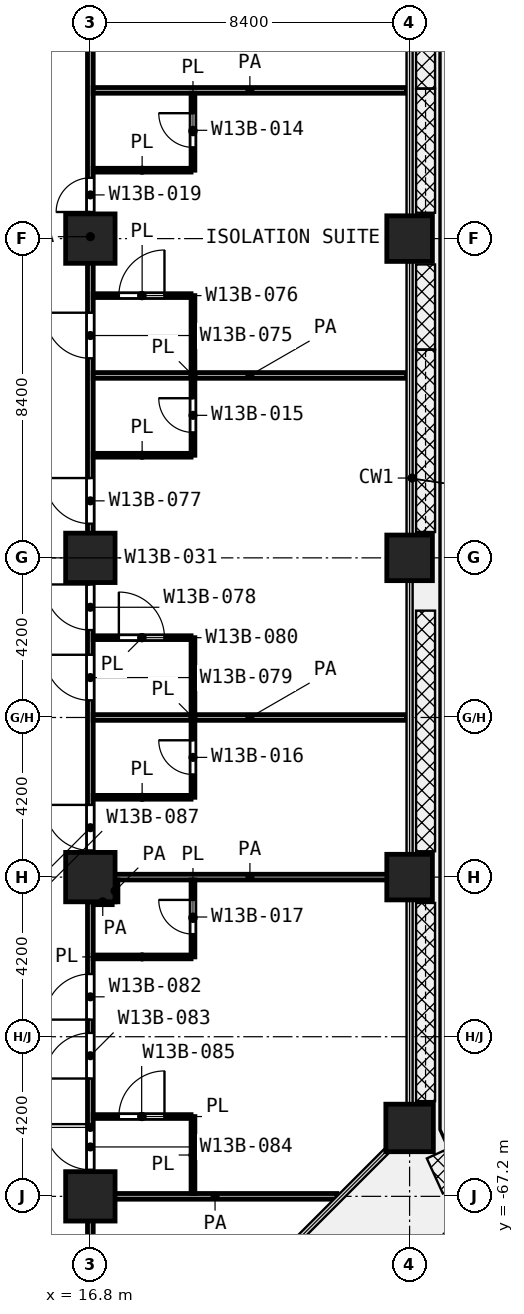
"""IFC4 building model, lengths in metres.
Left out: names, types, materials, properties, quantities, classifications, styles, units other than length and angle.
Written with IfcOpenShell. Run it as: python <this file> out.ifc"""

import sys

from ifc_helpers import new_model, si_unit, direction, frame, frame_2d, origin, origin_2d, place, context, subcontext, project, spatial, rectangle, extrude, element, fill, save


model = new_model("IFC4")
c1 = context("Model", 3, precision=1e-05, world=origin(), true_north=direction((0.0, 1.0)))
c2 = subcontext(c1, "Body", "Model", "MODEL_VIEW")
j1 = project(units=[si_unit("LENGTHUNIT", "METRE"), si_unit("PLANEANGLEUNIT", "RADIAN")], contexts=[c1])
p1 = place(None, origin())
s1 = spatial("IfcSite", under=j1, at=p1, CompositionType="ELEMENT")
p2 = place(p1, origin())
s2 = spatial("IfcBuilding", under=s1, at=p2, CompositionType="ELEMENT")
p3 = place(p2, frame((0.0, 0.0, 89.6)))
s3 = spatial("IfcBuildingStorey", under=s2, at=p3, CompositionType="ELEMENT", Elevation=89.6)
p4 = place(p3, frame((16.8, -42.0, 0.0), z_axis=(0.0, 0.0, 1.0), x_axis=(1.0, 0.0, 0.0)))
e1 = element("IfcColumn", 1, at=p4, inside=s3, PredefinedType="COLUMN", context=c2, shape_type="SweptSolid", body=[
    extrude(rectangle(XDim=1.3, YDim=1.3, at=origin_2d()), origin(), (0.0, 0.0, 1.0), 4.2),
])
p5 = place(p3, frame((25.2, -42.0, 0.0), z_axis=(0.0, 0.0, 1.0), x_axis=(1.0, 0.0, 0.0)))
e2 = element("IfcColumn", 2, at=p5, inside=s3, PredefinedType="COLUMN", context=c2, shape_type="SweptSolid", body=[
    extrude(rectangle(XDim=1.2, YDim=1.2, at=origin_2d()), origin(), (0.0, 0.0, 1.0), 4.2),
])
p6 = place(p3, frame((16.8, -50.4, 0.0), z_axis=(0.0, 0.0, 1.0), x_axis=(1.0, 0.0, 0.0)))
e3 = element("IfcColumn", 3, at=p6, inside=s3, PredefinedType="COLUMN", context=c2, shape_type="SweptSolid", body=[
    extrude(rectangle(XDim=1.3, YDim=1.3, at=origin_2d()), origin(), (0.0, 0.0, 1.0), 4.2),
])
p7 = place(p3, frame((25.2, -50.4, 0.0), z_axis=(0.0, 0.0, 1.0), x_axis=(1.0, 0.0, 0.0)))
e4 = element("IfcColumn", 4, at=p7, inside=s3, PredefinedType="COLUMN", context=c2, shape_type="SweptSolid", body=[
    extrude(rectangle(XDim=1.2, YDim=1.2, at=origin_2d()), origin(), (0.0, 0.0, 1.0), 4.2),
])
p8 = place(p3, frame((16.8, -58.8, 0.0), z_axis=(0.0, 0.0, 1.0), x_axis=(1.0, 0.0, 0.0)))
e5 = element("IfcColumn", 5, at=p8, inside=s3, PredefinedType="COLUMN", context=c2, shape_type="SweptSolid", body=[
    extrude(rectangle(XDim=1.3, YDim=1.3, at=origin_2d()), origin(), (0.0, 0.0, 1.0), 4.2),
])
p9 = place(p3, frame((25.2, -58.8, 0.0), z_axis=(0.0, 0.0, 1.0), x_axis=(1.0, 0.0, 0.0)))
e6 = element("IfcColumn", 6, at=p9, inside=s3, PredefinedType="COLUMN", context=c2, shape_type="SweptSolid", body=[
    extrude(rectangle(XDim=1.2, YDim=1.2, at=origin_2d()), origin(), (0.0, 0.0, 1.0), 4.2),
])
p10 = place(p3, frame((25.2, -65.4, 0.0), z_axis=(0.0, 0.0, 1.0), x_axis=(1.0, 0.0, 0.0)))
e7 = element("IfcColumn", 7, at=p10, inside=s3, PredefinedType="COLUMN", context=c2, shape_type="SweptSolid", body=[
    extrude(rectangle(XDim=1.25, YDim=1.25, at=origin_2d()), origin(), (0.0, 0.0, 1.0), 4.2),
])
p11 = place(p3, frame((16.8, -67.2, 0.0), z_axis=(0.0, 0.0, 1.0), x_axis=(1.0, 0.0, 0.0)))
e8 = element("IfcColumn", 8, at=p11, inside=s3, PredefinedType="COLUMN", context=c2, shape_type="SweptSolid", body=[
    extrude(rectangle(XDim=1.3, YDim=1.3, at=origin_2d()), origin(), (0.0, 0.0, 1.0), 4.2),
])
p12 = place(p3, frame((16.875, -65.1, 0.0), z_axis=(0.0, 0.0, 1.0), x_axis=(1.0, 0.0, 0.0)))
e9 = element("IfcWall", 9, at=p12, inside=s3, PredefinedType="PARTITIONING", context=c2, shape_type="SweptSolid", body=[
    extrude(rectangle(XDim=2.575, YDim=0.1, at=frame_2d((1.288, 0.0))), origin(), (0.0, 0.0, 1.0), 3.7),
])
p13 = place(p12, frame((0.675, 0.0, 0.0)))
e10 = element("IfcOpeningElement", 10, at=p13, cuts=e9, PredefinedType="OPENING", context=c2, shape_type="SweptSolid", body=[
    extrude(rectangle(XDim=1.2, YDim=2.1, at=frame_2d((0.6, 1.05))), frame((0.0, 0.06, 0.0), z_axis=(0.0, -1.0, 0.0), x_axis=(1.0, 0.0, 0.0)), (0.0, 0.0, 1.0), 0.12),
])
for number, where, z_axis, x_axis in (
    (11, (16.875, -60.9, 0.0), (0.0, 0.0, 1.0), (1.0, 0.0, 0.0)),
    (12, (16.875, -56.7, 0.0), (0.0, 0.0, 1.0), (1.0, 0.0, 0.0)),
):
    element("IfcWall", number, at=place(p3, frame(where, z_axis=z_axis, x_axis=x_axis)), inside=s3, PredefinedType="PARTITIONING", context=c2, shape_type="SweptSolid", body=[
        extrude(rectangle(XDim=2.575, YDim=0.1, at=frame_2d((1.288, 0.0))), origin(), (0.0, 0.0, 1.0), 3.7),
    ])
p14 = place(p3, frame((16.875, -52.5, 0.0), z_axis=(0.0, 0.0, 1.0), x_axis=(1.0, 0.0, 0.0)))
e13 = element("IfcWall", 13, at=p14, inside=s3, PredefinedType="PARTITIONING", context=c2, shape_type="SweptSolid", body=[
    extrude(rectangle(XDim=2.575, YDim=0.1, at=frame_2d((1.288, 0.0))), origin(), (0.0, 0.0, 1.0), 3.7),
])
p15 = place(p14, frame((0.675, 0.0, 0.0)))
e14 = element("IfcOpeningElement", 14, at=p15, cuts=e13, PredefinedType="OPENING", context=c2, shape_type="SweptSolid", body=[
    extrude(rectangle(XDim=1.2, YDim=2.1, at=frame_2d((0.6, 1.05))), frame((0.0, 0.06, 0.0), z_axis=(0.0, -1.0, 0.0), x_axis=(1.0, 0.0, 0.0)), (0.0, 0.0, 1.0), 0.12),
])
p16 = place(p3, frame((16.875, -47.7, 0.0), z_axis=(0.0, 0.0, 1.0), x_axis=(1.0, 0.0, 0.0)))
e15 = element("IfcWall", 15, at=p16, inside=s3, PredefinedType="PARTITIONING", context=c2, shape_type="SweptSolid", body=[
    extrude(rectangle(XDim=2.575, YDim=0.1, at=frame_2d((1.288, 0.0))), origin(), (0.0, 0.0, 1.0), 3.7),
])
p17 = place(p3, frame((16.875, -43.5, 0.0), z_axis=(0.0, 0.0, 1.0), x_axis=(1.0, 0.0, 0.0)))
e16 = element("IfcWall", 16, at=p17, inside=s3, PredefinedType="PARTITIONING", context=c2, shape_type="SweptSolid", body=[
    extrude(rectangle(XDim=2.575, YDim=0.1, at=frame_2d((1.288, 0.0))), origin(), (0.0, 0.0, 1.0), 3.7),
])
p18 = place(p17, frame((0.675, 0.0, 0.0)))
e17 = element("IfcOpeningElement", 17, at=p18, cuts=e16, PredefinedType="OPENING", context=c2, shape_type="SweptSolid", body=[
    extrude(rectangle(XDim=1.2, YDim=2.1, at=frame_2d((0.6, 1.05))), frame((0.0, 0.06, 0.0), z_axis=(0.0, -1.0, 0.0), x_axis=(1.0, 0.0, 0.0)), (0.0, 0.0, 1.0), 0.12),
])
p19 = place(p3, frame((16.875, -40.2, 0.0), z_axis=(0.0, 0.0, 1.0), x_axis=(1.0, 0.0, 0.0)))
e18 = element("IfcWall", 18, at=p19, inside=s3, PredefinedType="PARTITIONING", context=c2, shape_type="SweptSolid", body=[
    extrude(rectangle(XDim=2.575, YDim=0.1, at=frame_2d((1.288, 0.0))), origin(), (0.0, 0.0, 1.0), 3.7),
])
p20 = place(p3, frame((19.5, -67.125, 0.0), z_axis=(0.0, 0.0, 1.0), x_axis=(0.0, 1.0, 0.0)))
e19 = element("IfcWall", 19, at=p20, inside=s3, PredefinedType="PARTITIONING", context=c2, shape_type="SweptSolid", body=[
    extrude(rectangle(XDim=2.025, YDim=0.1, at=frame_2d((1.012, 0.0))), origin(), (0.0, 0.0, 1.0), 3.7),
])
p21 = place(p3, frame((19.5, -60.9, 0.0), z_axis=(0.0, 0.0, 1.0), x_axis=(0.0, 1.0, 0.0)))
e20 = element("IfcWall", 20, at=p21, inside=s3, PredefinedType="PARTITIONING", context=c2, shape_type="SweptSolid", body=[
    extrude(rectangle(XDim=2.025, YDim=0.1, at=frame_2d((1.012, 0.0))), origin(), (0.0, 0.0, 1.0), 3.7),
])
p22 = place(p21, frame((0.6, 0.0, 0.0)))
e21 = element("IfcOpeningElement", 21, at=p22, cuts=e20, PredefinedType="OPENING", context=c2, shape_type="SweptSolid", body=[
    extrude(rectangle(XDim=0.9, YDim=2.1, at=frame_2d((0.45, 1.05))), frame((0.0, 0.06, 0.0), z_axis=(0.0, -1.0, 0.0), x_axis=(1.0, 0.0, 0.0)), (0.0, 0.0, 1.0), 0.12),
])
p23 = place(p3, frame((19.5, -56.7, 0.0), z_axis=(0.0, 0.0, 1.0), x_axis=(0.0, 1.0, 0.0)))
e22 = element("IfcWall", 22, at=p23, inside=s3, PredefinedType="PARTITIONING", context=c2, shape_type="SweptSolid", body=[
    extrude(rectangle(XDim=4.2, YDim=0.1, at=frame_2d((2.1, 0.0))), origin(), (0.0, 0.0, 1.0), 3.7),
])
p24 = place(p23, frame((0.6, 0.0, 0.0)))
e23 = element("IfcOpeningElement", 23, at=p24, cuts=e22, PredefinedType="OPENING", context=c2, shape_type="SweptSolid", body=[
    extrude(rectangle(XDim=0.9, YDim=2.1, at=frame_2d((0.45, 1.05))), frame((0.0, 0.06, 0.0), z_axis=(0.0, -1.0, 0.0), x_axis=(1.0, 0.0, 0.0)), (0.0, 0.0, 1.0), 0.12),
])
p25 = place(p3, frame((19.5, -47.7, 0.0), z_axis=(0.0, 0.0, 1.0), x_axis=(0.0, 1.0, 0.0)))
e24 = element("IfcWall", 24, at=p25, inside=s3, PredefinedType="PARTITIONING", context=c2, shape_type="SweptSolid", body=[
    extrude(rectangle(XDim=4.2, YDim=0.1, at=frame_2d((2.1, 0.0))), origin(), (0.0, 0.0, 1.0), 3.7),
])
p26 = place(p25, frame((0.6, 0.0, 0.0)))
e25 = element("IfcOpeningElement", 25, at=p26, cuts=e24, PredefinedType="OPENING", context=c2, shape_type="SweptSolid", body=[
    extrude(rectangle(XDim=0.9, YDim=2.1, at=frame_2d((0.45, 1.05))), frame((0.0, 0.06, 0.0), z_axis=(0.0, -1.0, 0.0), x_axis=(1.0, 0.0, 0.0)), (0.0, 0.0, 1.0), 0.12),
])
p27 = place(p3, frame((19.5, -40.2, 0.0), z_axis=(0.0, 0.0, 1.0), x_axis=(0.0, 1.0, 0.0)))
e26 = element("IfcWall", 26, at=p27, inside=s3, PredefinedType="PARTITIONING", context=c2, shape_type="SweptSolid", body=[
    extrude(rectangle(XDim=2.025, YDim=0.1, at=frame_2d((1.012, 0.0))), origin(), (0.0, 0.0, 1.0), 3.7),
])
p28 = place(p27, frame((0.6, 0.0, 0.0)))
e27 = element("IfcOpeningElement", 27, at=p28, cuts=e26, PredefinedType="OPENING", context=c2, shape_type="SweptSolid", body=[
    extrude(rectangle(XDim=0.9, YDim=2.1, at=frame_2d((0.45, 1.05))), frame((0.0, 0.06, 0.0), z_axis=(0.0, -1.0, 0.0), x_axis=(1.0, 0.0, 0.0)), (0.0, 0.0, 1.0), 0.12),
])
p29 = place(p3, frame((16.875, -67.2, 0.0), z_axis=(0.0, 0.0, 1.0), x_axis=(1.0, 0.0, 0.0)))
e28 = element("IfcWall", 28, at=p29, inside=s3, PredefinedType="PARTITIONING", context=c2, shape_type="SweptSolid", body=[
    extrude(rectangle(XDim=6.412, YDim=0.15, at=frame_2d((3.206, 0.0))), origin(), (0.0, 0.0, 1.0), 3.7),
])
p30 = place(p3, frame((16.877, -59.45, 0.0), z_axis=(0.0, 0.0, 1.0), x_axis=(1.0, 0.0, 0.0)))
e29 = element("IfcWall", 29, at=p30, inside=s3, PredefinedType="PARTITIONING", context=c2, shape_type="SweptSolid", body=[
    extrude(rectangle(XDim=0.498, YDim=0.15, at=frame_2d((0.249, 0.0))), origin(), (0.0, 0.0, 1.0), 3.7),
])
p31 = place(p3, frame((16.877, -58.8, 0.0), z_axis=(0.0, 0.0, 1.0), x_axis=(1.0, 0.0, 0.0)))
e30 = element("IfcWall", 30, at=p31, inside=s3, PredefinedType="PARTITIONING", context=c2, shape_type="SweptSolid", body=[
    extrude(rectangle(XDim=8.243, YDim=0.15, at=frame_2d((4.122, 0.0))), origin(), (0.0, 0.0, 1.0), 3.7),
])
for number, where, z_axis, x_axis in (
    (31, (16.875, -54.6, 0.0), (0.0, 0.0, 1.0), (1.0, 0.0, 0.0)),
    (32, (16.875, -45.6, 0.0), (0.0, 0.0, 1.0), (1.0, 0.0, 0.0)),
    (33, (16.875, -38.1, 0.0), (0.0, 0.0, 1.0), (1.0, 0.0, 0.0)),
):
    element("IfcWall", number, at=place(p3, frame(where, z_axis=z_axis, x_axis=x_axis)), inside=s3, PredefinedType="PARTITIONING", context=c2, shape_type="SweptSolid", body=[
        extrude(rectangle(XDim=8.245, YDim=0.15, at=frame_2d((4.123, 0.0))), origin(), (0.0, 0.0, 1.0), 3.7),
    ])
p32 = place(p3, frame((16.8, -71.32, 0.0), z_axis=(0.0, 0.0, 1.0), x_axis=(0.0, 1.0, 0.0)))
e34 = element("IfcWall", 34, at=p32, inside=s3, PredefinedType="PARTITIONING", context=c2, shape_type="SweptSolid", body=[
    extrude(rectangle(XDim=11.868, YDim=0.15, at=frame_2d((5.934, 0.0))), origin(), (0.0, 0.0, 1.0), 3.7),
])
p33 = place(p32, frame((8.77, 0.0, 0.0)))
e35 = element("IfcOpeningElement", 35, at=p33, cuts=e34, PredefinedType="OPENING", context=c2, shape_type="SweptSolid", body=[
    extrude(rectangle(XDim=1.2, YDim=2.1, at=frame_2d((0.6, 1.05))), frame((0.0, 0.085, 0.0), z_axis=(0.0, -1.0, 0.0), x_axis=(1.0, 0.0, 0.0)), (0.0, 0.0, 1.0), 0.17),
])
p34 = place(p32, frame((7.22, 0.0, 0.0)))
e36 = element("IfcOpeningElement", 36, at=p34, cuts=e34, PredefinedType="OPENING", context=c2, shape_type="SweptSolid", body=[
    extrude(rectangle(XDim=1.2, YDim=2.1, at=frame_2d((0.6, 1.05))), frame((0.0, 0.085, 0.0), z_axis=(0.0, -1.0, 0.0), x_axis=(1.0, 0.0, 0.0)), (0.0, 0.0, 1.0), 0.17),
])
p35 = place(p32, frame((4.82, 0.0, 0.0)))
e37 = element("IfcOpeningElement", 37, at=p35, cuts=e34, PredefinedType="OPENING", context=c2, shape_type="SweptSolid", body=[
    extrude(rectangle(XDim=1.2, YDim=2.1, at=frame_2d((0.6, 1.05))), frame((0.0, 0.085, 0.0), z_axis=(0.0, -1.0, 0.0), x_axis=(1.0, 0.0, 0.0)), (0.0, 0.0, 1.0), 0.17),
])
p36 = place(p32, frame((1.52, 0.0, 0.0)))
e38 = element("IfcOpeningElement", 38, at=p36, cuts=e34, PredefinedType="OPENING", context=c2, shape_type="SweptSolid", body=[
    extrude(rectangle(XDim=1.0, YDim=2.1, at=frame_2d((0.5, 1.05))), frame((0.0, 0.085, 0.0), z_axis=(0.0, -1.0, 0.0), x_axis=(1.0, 0.0, 0.0)), (0.0, 0.0, 1.0), 0.17),
])
p37 = place(p3, frame((16.8, -58.798, 0.0), z_axis=(0.0, 0.0, 1.0), x_axis=(0.0, 1.0, 0.0)))
e39 = element("IfcWall", 39, at=p37, inside=s3, PredefinedType="PARTITIONING", context=c2, shape_type="SweptSolid", body=[
    extrude(rectangle(XDim=33.698, YDim=0.15, at=frame_2d((16.849, 0.0))), origin(), (0.0, 0.0, 1.0), 3.7),
])
p38 = place(p37, frame((23.248, 0.0, 0.0)))
e40 = element("IfcOpeningElement", 40, at=p38, cuts=e39, PredefinedType="OPENING", context=c2, shape_type="SweptSolid", body=[
    extrude(rectangle(XDim=1.2, YDim=2.1, at=frame_2d((0.6, 1.05))), frame((0.0, 0.085, 0.0), z_axis=(0.0, -1.0, 0.0), x_axis=(1.0, 0.0, 0.0)), (0.0, 0.0, 1.0), 0.17),
])
p39 = place(p37, frame((17.498, 0.0, 0.0)))
e41 = element("IfcOpeningElement", 41, at=p39, cuts=e39, PredefinedType="OPENING", context=c2, shape_type="SweptSolid", body=[
    extrude(rectangle(XDim=0.9, YDim=2.1, at=frame_2d((0.45, 1.05))), frame((0.0, 0.085, 0.0), z_axis=(0.0, -1.0, 0.0), x_axis=(1.0, 0.0, 0.0)), (0.0, 0.0, 1.0), 0.17),
])
p40 = place(p37, frame((13.648, 0.0, 0.0)))
e42 = element("IfcOpeningElement", 42, at=p40, cuts=e39, PredefinedType="OPENING", context=c2, shape_type="SweptSolid", body=[
    extrude(rectangle(XDim=1.2, YDim=2.1, at=frame_2d((0.6, 1.05))), frame((0.0, 0.085, 0.0), z_axis=(0.0, -1.0, 0.0), x_axis=(1.0, 0.0, 0.0)), (0.0, 0.0, 1.0), 0.17),
])
p41 = place(p37, frame((9.298, 0.0, 0.0)))
e43 = element("IfcOpeningElement", 43, at=p41, cuts=e39, PredefinedType="OPENING", context=c2, shape_type="SweptSolid", body=[
    extrude(rectangle(XDim=1.2, YDim=2.1, at=frame_2d((0.6, 1.05))), frame((0.0, 0.085, 0.0), z_axis=(0.0, -1.0, 0.0), x_axis=(1.0, 0.0, 0.0)), (0.0, 0.0, 1.0), 0.17),
])
p42 = place(p37, frame((6.498, 0.0, 0.0)))
e44 = element("IfcOpeningElement", 44, at=p42, cuts=e39, PredefinedType="OPENING", context=c2, shape_type="SweptSolid", body=[
    extrude(rectangle(XDim=1.2, YDim=2.1, at=frame_2d((0.6, 1.05))), frame((0.0, 0.085, 0.0), z_axis=(0.0, -1.0, 0.0), x_axis=(1.0, 0.0, 0.0)), (0.0, 0.0, 1.0), 0.17),
])
p43 = place(p37, frame((4.648, 0.0, 0.0)))
e45 = element("IfcOpeningElement", 45, at=p43, cuts=e39, PredefinedType="OPENING", context=c2, shape_type="SweptSolid", body=[
    extrude(rectangle(XDim=1.2, YDim=2.1, at=frame_2d((0.6, 1.05))), frame((0.0, 0.085, 0.0), z_axis=(0.0, -1.0, 0.0), x_axis=(1.0, 0.0, 0.0)), (0.0, 0.0, 1.0), 0.17),
])
p44 = place(p37, frame((0.698, 0.0, 0.0)))
e46 = element("IfcOpeningElement", 46, at=p44, cuts=e39, PredefinedType="OPENING", context=c2, shape_type="SweptSolid", body=[
    extrude(rectangle(XDim=1.2, YDim=2.1, at=frame_2d((0.6, 1.05))), frame((0.0, 0.085, 0.0), z_axis=(0.0, -1.0, 0.0), x_axis=(1.0, 0.0, 0.0)), (0.0, 0.0, 1.0), 0.17),
])
p45 = place(p3, frame((17.45, -59.45, 0.0), z_axis=(0.0, 0.0, 1.0), x_axis=(0.0, 1.0, 0.0)))
e47 = element("IfcWall", 47, at=p45, inside=s3, PredefinedType="PARTITIONING", context=c2, shape_type="SweptSolid", body=[
    extrude(rectangle(XDim=0.575, YDim=0.15, at=frame_2d((0.288, 0.0))), origin(), (0.0, 0.0, 1.0), 3.7),
])
p46 = place(p39, origin())
e48 = element("IfcDoor", 48, at=p46, inside=s3, OperationType="SINGLE_SWING_LEFT", PredefinedType="DOOR", context=c2, shape_type="SweptSolid", body=[
    extrude(rectangle(XDim=0.9, YDim=2.1, at=frame_2d((0.45, 1.05))), frame((0.0, 0.025, 0.0), z_axis=(0.0, -1.0, 0.0), x_axis=(1.0, 0.0, 0.0)), (0.0, 0.0, 1.0), 0.05),
])
fill(e41, e48)
p47 = place(p40, origin())
e49 = element("IfcDoor", 49, at=p47, inside=s3, OperationType="SINGLE_SWING_RIGHT", PredefinedType="DOOR", context=c2, shape_type="SweptSolid", body=[
    extrude(rectangle(XDim=1.2, YDim=2.1, at=frame_2d((0.6, 1.05))), frame((0.0, 0.025, 0.0), z_axis=(0.0, -1.0, 0.0), x_axis=(1.0, 0.0, 0.0)), (0.0, 0.0, 1.0), 0.05),
])
fill(e42, e49)
p48 = place(p18, origin())
e50 = element("IfcDoor", 50, at=p48, inside=s3, OperationType="SINGLE_SWING_RIGHT", PredefinedType="DOOR", context=c2, shape_type="SweptSolid", body=[
    extrude(rectangle(XDim=1.2, YDim=2.1, at=frame_2d((0.6, 1.05))), frame((0.0, 0.025, 0.0), z_axis=(0.0, -1.0, 0.0), x_axis=(1.0, 0.0, 0.0)), (0.0, 0.0, 1.0), 0.05),
])
fill(e17, e50)
p49 = place(p28, origin())
e51 = element("IfcDoor", 51, at=p49, inside=s3, OperationType="SINGLE_SWING_RIGHT", PredefinedType="DOOR", context=c2, shape_type="SweptSolid", body=[
    extrude(rectangle(XDim=0.9, YDim=2.1, at=frame_2d((0.45, 1.05))), frame((0.0, 0.025, 0.0), z_axis=(0.0, -1.0, 0.0), x_axis=(1.0, 0.0, 0.0)), (0.0, 0.0, 1.0), 0.05),
])
fill(e27, e51)
p50 = place(p41, origin())
e52 = element("IfcDoor", 52, at=p50, inside=s3, OperationType="SINGLE_SWING_RIGHT", PredefinedType="DOOR", context=c2, shape_type="SweptSolid", body=[
    extrude(rectangle(XDim=1.2, YDim=2.1, at=frame_2d((0.6, 1.05))), frame((0.0, 0.025, 0.0), z_axis=(0.0, -1.0, 0.0), x_axis=(1.0, 0.0, 0.0)), (0.0, 0.0, 1.0), 0.05),
])
fill(e43, e52)
p51 = place(p42, origin())
e53 = element("IfcDoor", 53, at=p51, inside=s3, OperationType="SINGLE_SWING_RIGHT", PredefinedType="DOOR", context=c2, shape_type="SweptSolid", body=[
    extrude(rectangle(XDim=1.2, YDim=2.1, at=frame_2d((0.6, 1.05))), frame((0.0, 0.025, 0.0), z_axis=(0.0, -1.0, 0.0), x_axis=(1.0, 0.0, 0.0)), (0.0, 0.0, 1.0), 0.05),
])
fill(e44, e53)
p52 = place(p43, origin())
e54 = element("IfcDoor", 54, at=p52, inside=s3, OperationType="SINGLE_SWING_RIGHT", PredefinedType="DOOR", context=c2, shape_type="SweptSolid", body=[
    extrude(rectangle(XDim=1.2, YDim=2.1, at=frame_2d((0.6, 1.05))), frame((0.0, 0.025, 0.0), z_axis=(0.0, -1.0, 0.0), x_axis=(1.0, 0.0, 0.0)), (0.0, 0.0, 1.0), 0.05),
])
fill(e45, e54)
p53 = place(p15, origin())
e55 = element("IfcDoor", 55, at=p53, inside=s3, OperationType="SINGLE_SWING_LEFT", PredefinedType="DOOR", context=c2, shape_type="SweptSolid", body=[
    extrude(rectangle(XDim=1.2, YDim=2.1, at=frame_2d((0.6, 1.05))), frame((0.0, 0.025, 0.0), z_axis=(0.0, -1.0, 0.0), x_axis=(1.0, 0.0, 0.0)), (0.0, 0.0, 1.0), 0.05),
])
fill(e14, e55)
p54 = place(p26, origin())
e56 = element("IfcDoor", 56, at=p54, inside=s3, OperationType="SINGLE_SWING_RIGHT", PredefinedType="DOOR", context=c2, shape_type="SweptSolid", body=[
    extrude(rectangle(XDim=0.9, YDim=2.1, at=frame_2d((0.45, 1.05))), frame((0.0, 0.025, 0.0), z_axis=(0.0, -1.0, 0.0), x_axis=(1.0, 0.0, 0.0)), (0.0, 0.0, 1.0), 0.05),
])
fill(e25, e56)
p55 = place(p44, origin())
e57 = element("IfcDoor", 57, at=p55, inside=s3, OperationType="SINGLE_SWING_RIGHT", PredefinedType="DOOR", context=c2, shape_type="SweptSolid", body=[
    extrude(rectangle(XDim=1.2, YDim=2.1, at=frame_2d((0.6, 1.05))), frame((0.0, 0.025, 0.0), z_axis=(0.0, -1.0, 0.0), x_axis=(1.0, 0.0, 0.0)), (0.0, 0.0, 1.0), 0.05),
])
fill(e46, e57)
p56 = place(p24, origin())
e58 = element("IfcDoor", 58, at=p56, inside=s3, OperationType="SINGLE_SWING_RIGHT", PredefinedType="DOOR", context=c2, shape_type="SweptSolid", body=[
    extrude(rectangle(XDim=0.9, YDim=2.1, at=frame_2d((0.45, 1.05))), frame((0.0, 0.025, 0.0), z_axis=(0.0, -1.0, 0.0), x_axis=(1.0, 0.0, 0.0)), (0.0, 0.0, 1.0), 0.05),
])
fill(e23, e58)
p57 = place(p33, origin())
e59 = element("IfcDoor", 59, at=p57, inside=s3, OperationType="SINGLE_SWING_LEFT", PredefinedType="DOOR", context=c2, shape_type="SweptSolid", body=[
    extrude(rectangle(XDim=1.2, YDim=2.1, at=frame_2d((0.6, 1.05))), frame((0.0, 0.025, 0.0), z_axis=(0.0, -1.0, 0.0), x_axis=(1.0, 0.0, 0.0)), (0.0, 0.0, 1.0), 0.05),
])
fill(e35, e59)
p58 = place(p34, origin())
e60 = element("IfcDoor", 60, at=p58, inside=s3, OperationType="SINGLE_SWING_LEFT", PredefinedType="DOOR", context=c2, shape_type="SweptSolid", body=[
    extrude(rectangle(XDim=1.2, YDim=2.1, at=frame_2d((0.6, 1.05))), frame((0.0, 0.025, 0.0), z_axis=(0.0, -1.0, 0.0), x_axis=(1.0, 0.0, 0.0)), (0.0, 0.0, 1.0), 0.05),
])
fill(e36, e60)
p59 = place(p35, origin())
e61 = element("IfcDoor", 61, at=p59, inside=s3, OperationType="SINGLE_SWING_RIGHT", PredefinedType="DOOR", context=c2, shape_type="SweptSolid", body=[
    extrude(rectangle(XDim=1.2, YDim=2.1, at=frame_2d((0.6, 1.05))), frame((0.0, 0.025, 0.0), z_axis=(0.0, -1.0, 0.0), x_axis=(1.0, 0.0, 0.0)), (0.0, 0.0, 1.0), 0.05),
])
fill(e37, e61)
p60 = place(p13, origin())
e62 = element("IfcDoor", 62, at=p60, inside=s3, OperationType="SINGLE_SWING_RIGHT", PredefinedType="DOOR", context=c2, shape_type="SweptSolid", body=[
    extrude(rectangle(XDim=1.2, YDim=2.1, at=frame_2d((0.6, 1.05))), frame((0.0, 0.025, 0.0), z_axis=(0.0, -1.0, 0.0), x_axis=(1.0, 0.0, 0.0)), (0.0, 0.0, 1.0), 0.05),
])
fill(e10, e62)
p61 = place(p22, origin())
e63 = element("IfcDoor", 63, at=p61, inside=s3, OperationType="SINGLE_SWING_RIGHT", PredefinedType="DOOR", context=c2, shape_type="SweptSolid", body=[
    extrude(rectangle(XDim=0.9, YDim=2.1, at=frame_2d((0.45, 1.05))), frame((0.0, 0.025, 0.0), z_axis=(0.0, -1.0, 0.0), x_axis=(1.0, 0.0, 0.0)), (0.0, 0.0, 1.0), 0.05),
])
fill(e21, e63)
save(model, sys.argv[1])
